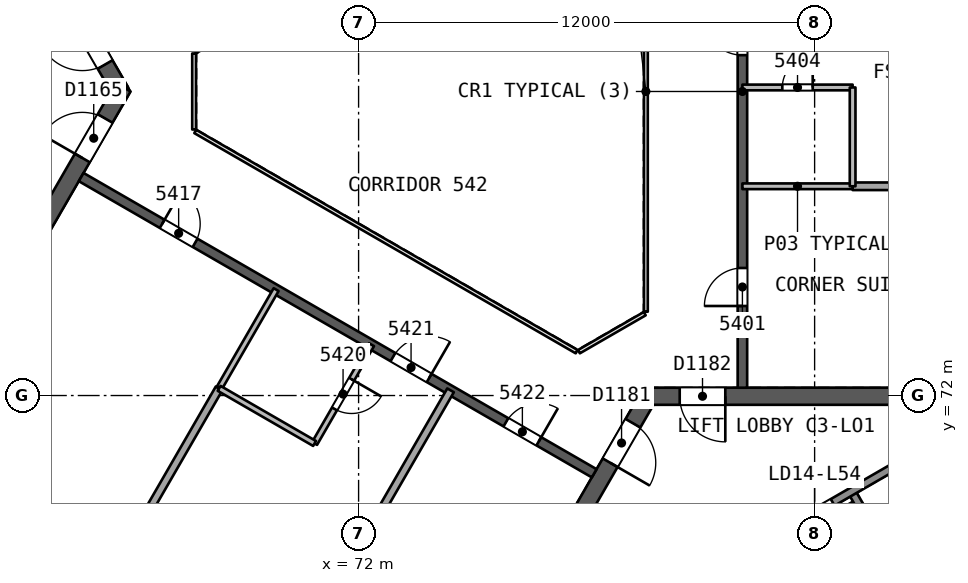
"""IFC4 building model, lengths in metres.
Left out: names, types, materials, properties, quantities, classifications, styles, units other than length and angle.
Written with IfcOpenShell. Run it as: python <this file> out.ifc"""

import sys

from ifc_helpers import new_model, si_unit, direction, frame, frame_2d, origin, place, context, subcontext, project, spatial, rectangle, extrude, element, fill, save


model = new_model("IFC4")
c1 = context("Model", 3, precision=1e-05, world=origin(), true_north=direction((0.0, 1.0)))
c2 = subcontext(c1, "Body", "Model", "MODEL_VIEW")
j1 = project(units=[si_unit("LENGTHUNIT", "METRE"), si_unit("PLANEANGLEUNIT", "RADIAN")], contexts=[c1])
p1 = place(None, origin())
s1 = spatial("IfcSite", under=j1, at=p1, CompositionType="ELEMENT")
p2 = place(p1, origin())
s2 = spatial("IfcBuilding", under=s1, at=p2, CompositionType="ELEMENT")
p3 = place(p2, frame((0.0, 0.0, 220.6)))
s3 = spatial("IfcBuildingStorey", under=s2, at=p3, CompositionType="ELEMENT", Elevation=220.6)
p4 = place(p3, frame((65.74, 80.0, 0.0), z_axis=(0.0, 0.0, 1.0), x_axis=(-0.499991857942, 0.866030104553, 0.0)))
e1 = element("IfcWall", 1, at=p4, inside=s3, PredefinedType="SHEAR", context=c2, shape_type="SweptSolid", body=[
    extrude(rectangle(XDim=10.25, YDim=0.45, at=frame_2d((5.125, 0.0))), origin(), (0.0, 0.0, 1.0), 3.7),
])
p5 = place(p4, frame((0.82, 0.0, 0.0)))
e2 = element("IfcOpeningElement", 2, at=p5, cuts=e1, PredefinedType="OPENING", context=c2, shape_type="SweptSolid", body=[
    extrude(rectangle(XDim=1.2, YDim=2.1, at=frame_2d((0.6, 1.05))), frame((0.0, 0.235, 0.0), z_axis=(0.0, -1.0, 0.0), x_axis=(1.0, 0.0, 0.0)), (0.0, 0.0, 1.0), 0.471),
])
p6 = place(p3, frame((60.728, 71.318, 0.0), z_axis=(0.0, 0.0, 1.0), x_axis=(0.500012416173, 0.866018235185, 0.0)))
e3 = element("IfcWall", 3, at=p6, inside=s3, PredefinedType="SHEAR", context=c2, shape_type="SweptSolid", body=[
    extrude(rectangle(XDim=10.155, YDim=0.45, at=frame_2d((5.078, 0.0))), origin(), (0.0, 0.0, 1.0), 3.7),
])
p7 = place(p6, frame((8.005, 0.0, 0.0)))
e4 = element("IfcOpeningElement", 4, at=p7, cuts=e3, PredefinedType="OPENING", context=c2, shape_type="SweptSolid", body=[
    extrude(rectangle(XDim=1.2, YDim=2.1, at=frame_2d((0.6, 1.05))), frame((0.0, 0.235, 0.0), z_axis=(0.0, -1.0, 0.0), x_axis=(1.0, 0.0, 0.0)), (0.0, 0.0, 1.0), 0.471),
])
p8 = place(p3, frame((79.63, 71.981, 0.0), z_axis=(0.0, 0.0, 1.0), x_axis=(-0.500002171595, -0.86602415001, 0.0)))
e5 = element("IfcWall", 5, at=p8, inside=s3, PredefinedType="SHEAR", context=c2, shape_type="SweptSolid", body=[
    extrude(rectangle(XDim=10.25, YDim=0.45, at=frame_2d((5.125, 0.0))), origin(), (0.0, 0.0, 1.0), 3.7),
])
p9 = place(p8, frame((0.82, 0.0, 0.0)))
e6 = element("IfcOpeningElement", 6, at=p9, cuts=e5, PredefinedType="OPENING", context=c2, shape_type="SweptSolid", body=[
    extrude(rectangle(XDim=1.2, YDim=2.1, at=frame_2d((0.6, 1.05))), frame((0.0, 0.235, 0.0), z_axis=(0.0, -1.0, 0.0), x_axis=(1.0, 0.0, 0.0)), (0.0, 0.0, 1.0), 0.471),
])
p10 = place(p3, frame((89.655, 71.981, 0.0), z_axis=(0.0, 0.0, 1.0), x_axis=(-1.0, 0.0, 0.0)))
e7 = element("IfcWall", 7, at=p10, inside=s3, PredefinedType="SHEAR", context=c2, shape_type="SweptSolid", body=[
    extrude(rectangle(XDim=10.155, YDim=0.45, at=frame_2d((5.078, 0.0))), origin(), (0.0, 0.0, 1.0), 3.7),
])
p11 = place(p10, frame((8.005, 0.0, 0.0)))
e8 = element("IfcOpeningElement", 8, at=p11, cuts=e7, PredefinedType="OPENING", context=c2, shape_type="SweptSolid", body=[
    extrude(rectangle(XDim=1.2, YDim=2.1, at=frame_2d((0.6, 1.05))), frame((0.0, 0.235, 0.0), z_axis=(0.0, -1.0, 0.0), x_axis=(1.0, 0.0, 0.0)), (0.0, 0.0, 1.0), 0.471),
])
p12 = place(p3, frame((82.1, 72.206, 0.0), z_axis=(0.0, 0.0, 1.0), x_axis=(0.0, 1.0, 0.0)))
e9 = element("IfcWall", 9, at=p12, inside=s3, PredefinedType="SHEAR", context=c2, shape_type="SweptSolid", body=[
    extrude(rectangle(XDim=15.588, YDim=0.25, at=frame_2d((7.794, 0.0))), origin(), (0.0, 0.0, 1.0), 3.3),
])
p13 = place(p12, frame((2.15, 0.0, 0.0)))
e10 = element("IfcOpeningElement", 10, at=p13, cuts=e9, PredefinedType="OPENING", context=c2, shape_type="SweptSolid", body=[
    extrude(rectangle(XDim=1.0, YDim=2.1, at=frame_2d((0.5, 1.05))), frame((0.0, 0.135, 0.0), z_axis=(0.0, -1.0, 0.0), x_axis=(1.0, 0.0, 0.0)), (0.0, 0.0, 1.0), 0.271),
])
p14 = place(p12, frame((8.75, 0.0, 0.0)))
e11 = element("IfcOpeningElement", 11, at=p14, cuts=e9, PredefinedType="OPENING", context=c2, shape_type="SweptSolid", body=[
    extrude(rectangle(XDim=1.0, YDim=2.1, at=frame_2d((0.5, 1.05))), frame((0.0, 0.135, 0.0), z_axis=(0.0, -1.0, 0.0), x_axis=(1.0, 0.0, 0.0)), (0.0, 0.0, 1.0), 0.271),
])
p15 = place(p12, frame((12.594, 0.0, 0.0)))
e12 = element("IfcOpeningElement", 12, at=p15, cuts=e9, PredefinedType="OPENING", context=c2, shape_type="SweptSolid", body=[
    extrude(rectangle(XDim=1.0, YDim=2.1, at=frame_2d((0.5, 1.05))), frame((0.0, 0.135, 0.0), z_axis=(0.0, -1.0, 0.0), x_axis=(1.0, 0.0, 0.0)), (0.0, 0.0, 1.0), 0.271),
])
p16 = place(p3, frame((64.7, 77.748, 0.0), z_axis=(0.0, 0.0, 1.0), x_axis=(0.866026492143, -0.499998114903, 0.0)))
e13 = element("IfcWall", 13, at=p16, inside=s3, PredefinedType="SHEAR", context=c2, shape_type="SweptSolid", body=[
    extrude(rectangle(XDim=15.588, YDim=0.25, at=frame_2d((7.794, 0.0))), origin(), (0.0, 0.0, 1.0), 3.3),
])
p17 = place(p16, frame((2.462, 0.0, 0.0)))
e14 = element("IfcOpeningElement", 14, at=p17, cuts=e13, PredefinedType="OPENING", context=c2, shape_type="SweptSolid", body=[
    extrude(rectangle(XDim=1.0, YDim=2.1, at=frame_2d((0.5, 1.05))), frame((0.0, 0.135, 0.0), z_axis=(0.0, -1.0, 0.0), x_axis=(1.0, 0.0, 0.0)), (0.0, 0.0, 1.0), 0.271),
])
p18 = place(p16, frame((9.474, 0.0, 0.0)))
e15 = element("IfcOpeningElement", 15, at=p18, cuts=e13, PredefinedType="OPENING", context=c2, shape_type="SweptSolid", body=[
    extrude(rectangle(XDim=1.1, YDim=2.1, at=frame_2d((0.55, 1.05))), frame((0.0, 0.135, 0.0), z_axis=(0.0, -1.0, 0.0), x_axis=(1.0, 0.0, 0.0)), (0.0, 0.0, 1.0), 0.271),
])
p19 = place(p16, frame((12.906, 0.0, 0.0)))
e16 = element("IfcOpeningElement", 16, at=p19, cuts=e13, PredefinedType="OPENING", context=c2, shape_type="SweptSolid", body=[
    extrude(rectangle(XDim=1.0, YDim=2.1, at=frame_2d((0.5, 1.05))), frame((0.0, 0.135, 0.0), z_axis=(0.0, -1.0, 0.0), x_axis=(1.0, 0.0, 0.0)), (0.0, 0.0, 1.0), 0.271),
])
p20 = place(p3, frame((92.503, 77.506, 0.0), z_axis=(0.0, 0.0, 1.0), x_axis=(-1.0, 0.0, 0.0)))
e17 = element("IfcWall", 17, at=p20, inside=s3, PredefinedType="PARTITIONING", context=c2, shape_type="SweptSolid", body=[
    extrude(rectangle(XDim=7.503, YDim=0.2, at=frame_2d((3.751, 0.0))), origin(), (0.0, 0.0, 1.0), 3.3),
])
p21 = place(p3, frame((85.0, 77.506, 0.0), z_axis=(0.0, 0.0, 1.0), x_axis=(-1.0, 0.0, 0.0)))
e18 = element("IfcWall", 18, at=p21, inside=s3, PredefinedType="PARTITIONING", context=c2, shape_type="SweptSolid", body=[
    extrude(rectangle(XDim=2.9, YDim=0.15, at=frame_2d((1.45, 0.0))), origin(), (0.0, 0.0, 1.0), 3.3),
])
p22 = place(p3, frame((82.1, 80.106, 0.0), z_axis=(0.0, 0.0, 1.0), x_axis=(1.0, 0.0, 0.0)))
e19 = element("IfcWall", 19, at=p22, inside=s3, PredefinedType="PARTITIONING", context=c2, shape_type="SweptSolid", body=[
    extrude(rectangle(XDim=2.9, YDim=0.15, at=frame_2d((1.45, 0.0))), origin(), (0.0, 0.0, 1.0), 3.3),
])
p23 = place(p22, frame((1.05, 0.0, 0.0)))
e20 = element("IfcOpeningElement", 20, at=p23, cuts=e19, PredefinedType="OPENING", context=c2, shape_type="SweptSolid", body=[
    extrude(rectangle(XDim=0.8, YDim=2.1, at=frame_2d((0.4, 1.05))), frame((0.0, 0.085, 0.0), z_axis=(0.0, -1.0, 0.0), x_axis=(1.0, 0.0, 0.0)), (0.0, 0.0, 1.0), 0.171),
])
p24 = place(p3, frame((85.0, 80.106, 0.0), z_axis=(0.0, 0.0, 1.0), x_axis=(0.0, -1.0, 0.0)))
e21 = element("IfcWall", 21, at=p24, inside=s3, PredefinedType="PARTITIONING", context=c2, shape_type="SweptSolid", body=[
    extrude(rectangle(XDim=2.6, YDim=0.15, at=frame_2d((1.3, 0.0))), origin(), (0.0, 0.0, 1.0), 3.3),
])
p25 = place(p3, frame((64.628, 65.777, 0.0), z_axis=(0.0, 0.0, 1.0), x_axis=(0.500019340035, 0.866014237522, 0.0)))
e22 = element("IfcWall", 22, at=p25, inside=s3, PredefinedType="PARTITIONING", context=c2, shape_type="SweptSolid", body=[
    extrude(rectangle(XDim=7.403, YDim=0.2, at=frame_2d((3.702, 0.0))), origin(), (0.0, 0.0, 1.0), 3.3),
])
p26 = place(p3, frame((68.33, 72.188, 0.0), z_axis=(0.0, 0.0, 1.0), x_axis=(0.499990139034, 0.866031096941, 0.0)))
e23 = element("IfcWall", 23, at=p26, inside=s3, PredefinedType="PARTITIONING", context=c2, shape_type="SweptSolid", body=[
    extrude(rectangle(XDim=3.0, YDim=0.15, at=frame_2d((1.5, 0.0))), origin(), (0.0, 0.0, 1.0), 3.3),
])
p27 = place(p3, frame((72.342, 73.336, 0.0), z_axis=(0.0, 0.0, 1.0), x_axis=(-0.50002537861, -0.866010750942, 0.0)))
e24 = element("IfcWall", 24, at=p27, inside=s3, PredefinedType="PARTITIONING", context=c2, shape_type="SweptSolid", body=[
    extrude(rectangle(XDim=3.0, YDim=0.15, at=frame_2d((1.5, 0.0))), origin(), (0.0, 0.0, 1.0), 3.3),
])
p28 = place(p27, frame((1.05, 0.0, 0.0)))
e25 = element("IfcOpeningElement", 25, at=p28, cuts=e24, PredefinedType="OPENING", context=c2, shape_type="SweptSolid", body=[
    extrude(rectangle(XDim=0.9, YDim=2.1, at=frame_2d((0.45, 1.05))), frame((0.0, 0.085, 0.0), z_axis=(0.0, -1.0, 0.0), x_axis=(1.0, 0.0, 0.0)), (0.0, 0.0, 1.0), 0.171),
])
p29 = place(p3, frame((70.842, 70.739, 0.0), z_axis=(0.0, 0.0, 1.0), x_axis=(-0.866032775405, 0.499987231761, 0.0)))
e26 = element("IfcWall", 26, at=p29, inside=s3, PredefinedType="PARTITIONING", context=c2, shape_type="SweptSolid", body=[
    extrude(rectangle(XDim=2.9, YDim=0.15, at=frame_2d((1.45, 0.0))), origin(), (0.0, 0.0, 1.0), 3.3),
])
p30 = place(p3, frame((69.219, 63.127, 0.0), z_axis=(0.0, 0.0, 1.0), x_axis=(0.499993317952, 0.866029261632, 0.0)))
e27 = element("IfcWall", 27, at=p30, inside=s3, PredefinedType="PARTITIONING", context=c2, shape_type="SweptSolid", body=[
    extrude(rectangle(XDim=10.403, YDim=0.2, at=frame_2d((5.202, 0.0))), origin(), (0.0, 0.0, 1.0), 3.3),
])
p31 = place(p3, frame((88.155, 52.022, 0.0), z_axis=(0.0, 0.0, 1.0), x_axis=(-0.866024521231, 0.500001528624, 0.0)))
e28 = element("IfcWall", 28, at=p31, inside=s3, PredefinedType="SOLIDWALL", context=c2, shape_type="SweptSolid", body=[
    extrude(rectangle(XDim=50.762, YDim=0.3, at=frame_2d((25.381, 0.0))), origin(), (0.0, 0.0, 1.0), 3.3),
])
p32 = place(p31, frame((23.402, 0.0, 0.0)))
e29 = element("IfcOpeningElement", 29, at=p32, cuts=e28, PredefinedType="OPENING", context=c2, shape_type="SweptSolid", body=[
    extrude(rectangle(XDim=2.4, YDim=2.4, at=frame_2d((1.2, 1.2))), frame((0.0, 0.161, 0.0), z_axis=(0.0, -1.0, 0.0), x_axis=(1.0, 0.0, 0.0)), (0.0, 0.0, 1.0), 0.321),
])
p33 = place(p31, frame((29.013, 0.0, 0.0)))
e30 = element("IfcOpeningElement", 30, at=p33, cuts=e28, PredefinedType="OPENING", context=c2, shape_type="SweptSolid", body=[
    extrude(rectangle(XDim=2.4, YDim=2.4, at=frame_2d((1.2, 1.2))), frame((0.0, 0.161, 0.0), z_axis=(0.0, -1.0, 0.0), x_axis=(1.0, 0.0, 0.0)), (0.0, 0.0, 1.0), 0.321),
])
p34 = place(p31, frame((39.492, 0.0, 0.0)))
e31 = element("IfcOpeningElement", 31, at=p34, cuts=e28, PredefinedType="OPENING", context=c2, shape_type="SweptSolid", body=[
    extrude(rectangle(XDim=2.4, YDim=2.4, at=frame_2d((1.2, 1.2))), frame((0.0, 0.161, 0.0), z_axis=(0.0, -1.0, 0.0), x_axis=(1.0, 0.0, 0.0)), (0.0, 0.0, 1.0), 0.321),
])
p35 = place(p31, frame((18.569, 0.0, 0.0)))
e32 = element("IfcOpeningElement", 32, at=p35, cuts=e28, PredefinedType="OPENING", context=c2, shape_type="SweptSolid", body=[
    extrude(rectangle(XDim=2.4, YDim=2.4, at=frame_2d((1.2, 1.2))), frame((0.0, 0.161, 0.0), z_axis=(0.0, -1.0, 0.0), x_axis=(1.0, 0.0, 0.0)), (0.0, 0.0, 1.0), 0.321),
])
p36 = place(p31, frame((8.878, 0.0, 0.0)))
e33 = element("IfcOpeningElement", 33, at=p36, cuts=e28, PredefinedType="OPENING", context=c2, shape_type="SweptSolid", body=[
    extrude(rectangle(XDim=2.4, YDim=2.4, at=frame_2d((1.2, 1.2))), frame((0.0, 0.161, 0.0), z_axis=(0.0, -1.0, 0.0), x_axis=(1.0, 0.0, 0.0)), (0.0, 0.0, 1.0), 0.321),
])
p37 = place(p3, frame((84.973, 69.477, 0.0), z_axis=(0.0, 0.0, 1.0), x_axis=(0.499996545922, -0.866027397988, 0.0)))
e34 = element("IfcWall", 34, at=p37, inside=s3, PredefinedType="SOLIDWALL", context=c2, shape_type="SweptSolid", body=[
    extrude(rectangle(XDim=2.75, YDim=0.2, at=frame_2d((1.375, 0.0))), origin(), (0.0, 0.0, 1.0), 3.3),
])
p38 = place(p3, frame((77.135, 64.952, 0.0), z_axis=(0.0, 0.0, 1.0), x_axis=(0.866031916153, 0.499988720078, 0.0)))
e35 = element("IfcWall", 35, at=p38, inside=s3, PredefinedType="SOLIDWALL", context=c2, shape_type="SweptSolid", body=[
    extrude(rectangle(XDim=11.35, YDim=0.2, at=frame_2d((5.675, 0.0))), origin(), (0.0, 0.0, 1.0), 3.3),
])
p39 = place(p38, frame((2.875, 0.0, 0.0)))
e36 = element("IfcOpeningElement", 36, at=p39, cuts=e35, PredefinedType="OPENING", context=c2, shape_type="SweptSolid", body=[
    extrude(rectangle(XDim=1.1, YDim=2.1, at=frame_2d((0.55, 1.05))), frame((0.0, 0.11, 0.0), z_axis=(0.0, -1.0, 0.0), x_axis=(1.0, 0.0, 0.0)), (0.0, 0.0, 1.0), 0.221),
])
p40 = place(p38, frame((5.125, 0.0, 0.0)))
e37 = element("IfcOpeningElement", 37, at=p40, cuts=e35, PredefinedType="OPENING", context=c2, shape_type="SweptSolid", body=[
    extrude(rectangle(XDim=1.1, YDim=2.1, at=frame_2d((0.55, 1.05))), frame((0.0, 0.11, 0.0), z_axis=(0.0, -1.0, 0.0), x_axis=(1.0, 0.0, 0.0)), (0.0, 0.0, 1.0), 0.221),
])
p41 = place(p38, frame((7.375, 0.0, 0.0)))
e38 = element("IfcOpeningElement", 38, at=p41, cuts=e35, PredefinedType="OPENING", context=c2, shape_type="SweptSolid", body=[
    extrude(rectangle(XDim=1.1, YDim=2.1, at=frame_2d((0.55, 1.05))), frame((0.0, 0.11, 0.0), z_axis=(0.0, -1.0, 0.0), x_axis=(1.0, 0.0, 0.0)), (0.0, 0.0, 1.0), 0.221),
])
for number, where, z_axis, x_axis in (
    (39, (79.56, 74.206, 0.0), (0.0, 0.0, 1.0), (0.0, 1.0, 0.0)),
    (40, (77.738, 86.846, 0.0), (0.0, 0.0, 1.0), (-0.866, -0.5, 0.0)),
):
    element("IfcWall", number, at=place(p3, frame(where, z_axis=z_axis, x_axis=x_axis)), inside=s3, PredefinedType="PARTITIONING", context=c2, shape_type="SweptSolid", body=[
        extrude(rectangle(XDim=11.588, YDim=0.1, at=frame_2d((5.794, 0.0))), origin(), (0.0, 0.0, 1.0), 3.3),
    ])
p42 = place(p3, frame((67.672, 81.0, 0.0), z_axis=(0.0, 0.0, 1.0), x_axis=(0.0, -1.0, 0.0)))
e41 = element("IfcWall", 41, at=p42, inside=s3, PredefinedType="PARTITIONING", context=c2, shape_type="SweptSolid", body=[
    extrude(rectangle(XDim=2.0, YDim=0.1, at=frame_2d((1.0, 0.0))), origin(), (0.0, 0.0, 1.0), 3.3),
])
p43 = place(p3, frame((67.702, 78.948, 0.0), z_axis=(0.0, 0.0, 1.0), x_axis=(0.866026658274, -0.499997827154, 0.0)))
e42 = element("IfcWall", 42, at=p43, inside=s3, PredefinedType="PARTITIONING", context=c2, shape_type="SweptSolid", body=[
    extrude(rectangle(XDim=11.588, YDim=0.1, at=frame_2d((5.794, 0.0))), origin(), (0.0, 0.0, 1.0), 3.3),
])
p44 = place(p3, frame((77.798, 73.154, 0.0), z_axis=(0.0, 0.0, 1.0), x_axis=(0.866041268327, 0.499972520799, 0.0)))
e43 = element("IfcWall", 43, at=p44, inside=s3, PredefinedType="PARTITIONING", context=c2, shape_type="SweptSolid", body=[
    extrude(rectangle(XDim=2.0, YDim=0.1, at=frame_2d((1.0, 0.0))), origin(), (0.0, 0.0, 1.0), 3.3),
])
p45 = place(p13, origin())
e44 = element("IfcDoor", 44, at=p45, inside=s3, OperationType="SINGLE_SWING_LEFT", PredefinedType="NOTDEFINED", context=c2, shape_type="SweptSolid", body=[
    extrude(rectangle(XDim=1.0, YDim=2.1, at=frame_2d((0.5, 1.05))), frame((0.0, 0.025, 0.0), z_axis=(0.0, -1.0, 0.0), x_axis=(1.0, 0.0, 0.0)), (0.0, 0.0, 1.0), 0.05),
])
fill(e10, e44)
p46 = place(p23, origin())
e45 = element("IfcDoor", 45, at=p46, inside=s3, OperationType="SINGLE_SWING_RIGHT", PredefinedType="NOTDEFINED", context=c2, shape_type="SweptSolid", body=[
    extrude(rectangle(XDim=0.8, YDim=2.1, at=frame_2d((0.4, 1.05))), frame((0.0, 0.025, 0.0), z_axis=(0.0, -1.0, 0.0), x_axis=(1.0, 0.0, 0.0)), (0.0, 0.0, 1.0), 0.05),
])
fill(e20, e45)
p47 = place(p14, origin())
e46 = element("IfcDoor", 46, at=p47, inside=s3, OperationType="SINGLE_SWING_RIGHT", PredefinedType="NOTDEFINED", context=c2, shape_type="SweptSolid", body=[
    extrude(rectangle(XDim=1.0, YDim=2.1, at=frame_2d((0.5, 1.05))), frame((0.0, 0.025, 0.0), z_axis=(0.0, -1.0, 0.0), x_axis=(1.0, 0.0, 0.0)), (0.0, 0.0, 1.0), 0.05),
])
fill(e11, e46)
p48 = place(p17, origin())
e47 = element("IfcDoor", 47, at=p48, inside=s3, OperationType="SINGLE_SWING_LEFT", PredefinedType="NOTDEFINED", context=c2, shape_type="SweptSolid", body=[
    extrude(rectangle(XDim=1.0, YDim=2.1, at=frame_2d((0.5, 1.05))), frame((0.0, 0.025, 0.0), z_axis=(0.0, -1.0, 0.0), x_axis=(1.0, 0.0, 0.0)), (0.0, 0.0, 1.0), 0.05),
])
fill(e14, e47)
p49 = place(p28, origin())
e48 = element("IfcDoor", 48, at=p49, inside=s3, OperationType="SINGLE_SWING_LEFT", PredefinedType="NOTDEFINED", context=c2, shape_type="SweptSolid", body=[
    extrude(rectangle(XDim=0.9, YDim=2.1, at=frame_2d((0.45, 1.05))), frame((0.0, 0.025, 0.0), z_axis=(0.0, -1.0, 0.0), x_axis=(1.0, 0.0, 0.0)), (0.0, 0.0, 1.0), 0.05),
])
fill(e25, e48)
p50 = place(p18, origin())
e49 = element("IfcDoor", 49, at=p50, inside=s3, OperationType="SINGLE_SWING_RIGHT", PredefinedType="NOTDEFINED", context=c2, shape_type="SweptSolid", body=[
    extrude(rectangle(XDim=1.1, YDim=2.1, at=frame_2d((0.55, 1.05))), frame((0.0, 0.025, 0.0), z_axis=(0.0, -1.0, 0.0), x_axis=(1.0, 0.0, 0.0)), (0.0, 0.0, 1.0), 0.05),
])
fill(e15, e49)
p51 = place(p19, origin())
e50 = element("IfcDoor", 50, at=p51, inside=s3, OperationType="SINGLE_SWING_RIGHT", PredefinedType="NOTDEFINED", context=c2, shape_type="SweptSolid", body=[
    extrude(rectangle(XDim=1.0, YDim=2.1, at=frame_2d((0.5, 1.05))), frame((0.0, 0.025, 0.0), z_axis=(0.0, -1.0, 0.0), x_axis=(1.0, 0.0, 0.0)), (0.0, 0.0, 1.0), 0.05),
])
fill(e16, e50)
p52 = place(p5, origin())
e51 = element("IfcDoor", 51, at=p52, inside=s3, OperationType="SINGLE_SWING_RIGHT", PredefinedType="NOTDEFINED", context=c2, shape_type="SweptSolid", body=[
    extrude(rectangle(XDim=1.2, YDim=2.1, at=frame_2d((0.6, 1.05))), frame((0.0, 0.025, 0.0), z_axis=(0.0, -1.0, 0.0), x_axis=(1.0, 0.0, 0.0)), (0.0, 0.0, 1.0), 0.05),
])
fill(e2, e51)
p53 = place(p7, origin())
e52 = element("IfcDoor", 52, at=p53, inside=s3, OperationType="SINGLE_SWING_LEFT", PredefinedType="NOTDEFINED", context=c2, shape_type="SweptSolid", body=[
    extrude(rectangle(XDim=1.2, YDim=2.1, at=frame_2d((0.6, 1.05))), frame((0.0, 0.025, 0.0), z_axis=(0.0, -1.0, 0.0), x_axis=(1.0, 0.0, 0.0)), (0.0, 0.0, 1.0), 0.05),
])
fill(e4, e52)
p54 = place(p9, origin())
e53 = element("IfcDoor", 53, at=p54, inside=s3, OperationType="SINGLE_SWING_RIGHT", PredefinedType="NOTDEFINED", context=c2, shape_type="SweptSolid", body=[
    extrude(rectangle(XDim=1.2, YDim=2.1, at=frame_2d((0.6, 1.05))), frame((0.0, 0.025, 0.0), z_axis=(0.0, -1.0, 0.0), x_axis=(1.0, 0.0, 0.0)), (0.0, 0.0, 1.0), 0.05),
])
fill(e6, e53)
p55 = place(p11, origin())
e54 = element("IfcDoor", 54, at=p55, inside=s3, OperationType="SINGLE_SWING_LEFT", PredefinedType="NOTDEFINED", context=c2, shape_type="SweptSolid", body=[
    extrude(rectangle(XDim=1.2, YDim=2.1, at=frame_2d((0.6, 1.05))), frame((0.0, 0.025, 0.0), z_axis=(0.0, -1.0, 0.0), x_axis=(1.0, 0.0, 0.0)), (0.0, 0.0, 1.0), 0.05),
])
fill(e8, e54)
p56 = place(p41, origin())
e55 = element("IfcDoor", 55, at=p56, inside=s3, OperationType="SLIDING_TO_LEFT", PredefinedType="NOTDEFINED", context=c2, shape_type="SweptSolid", body=[
    extrude(rectangle(XDim=1.1, YDim=2.1, at=frame_2d((0.55, 1.05))), frame((0.0, 0.025, 0.0), z_axis=(0.0, -1.0, 0.0), x_axis=(1.0, 0.0, 0.0)), (0.0, 0.0, 1.0), 0.05),
])
fill(e38, e55)
save(model, sys.argv[1])
